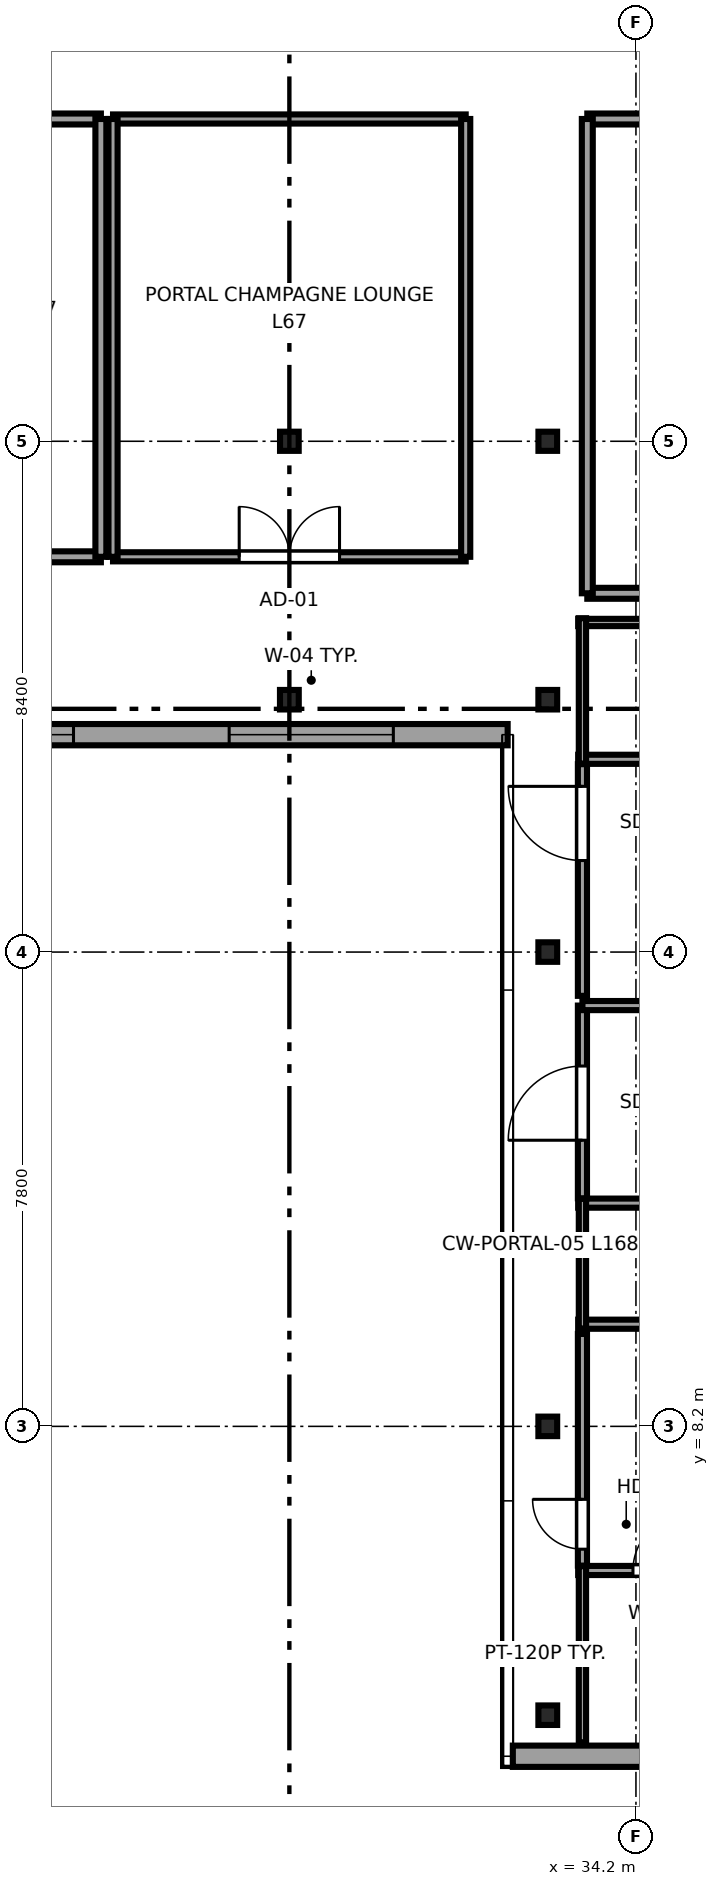
"""IFC4 building model, lengths in metres.
Left out: names, types, materials, properties, quantities, classifications, styles, units other than length and angle.
Written with IfcOpenShell. Run it as: python <this file> out.ifc"""

import sys

from ifc_helpers import new_model, si_unit, direction, frame, frame_2d, origin, origin_2d, place, context, subcontext, project, spatial, rectangle, i_section, extrude, source, transform, mapped, element, fill, save


model = new_model("IFC4")
c1 = context("Model", 3, precision=1e-05, world=origin(), true_north=direction((0.0, 1.0)))
c2 = subcontext(c1, "Body", "Model", "MODEL_VIEW")
j1 = project(units=[si_unit("LENGTHUNIT", "METRE"), si_unit("PLANEANGLEUNIT", "RADIAN")], contexts=[c1])
p1 = place(None, origin())
s1 = spatial("IfcSite", under=j1, at=p1, CompositionType="ELEMENT")
p2 = place(p1, origin())
s2 = spatial("IfcBuilding", under=s1, at=p2, CompositionType="ELEMENT")
p3 = place(p2, frame((0.0, 0.0, 252.3)))
s3 = spatial("IfcBuildingStorey", under=s2, at=p3, CompositionType="ELEMENT", Elevation=252.3)
m1 = source(origin(), c2, "Body", "SweptSolid", [
    extrude(i_section(OverallWidth=0.309, OverallDepth=0.321, WebThickness=0.014, FlangeThickness=0.022, FilletRadius=0.017, at=origin_2d()), origin(), (0.0, 0.0, 1.0), 3.55),
])
for number, where, z_axis, x_axis in (
    (1, (32.75, 3.45, 0.0), (0.0, 0.0, 1.0), (1.0, 0.0, 0.0)),
    (2, (32.75, 8.2, 0.0), (0.0, 0.0, 1.0), (1.0, 0.0, 0.0)),
    (3, (32.75, 16.0, 0.0), (0.0, 0.0, 1.0), (1.0, 0.0, 0.0)),
):
    element("IfcColumn", number, at=place(p3, frame(where, z_axis=z_axis, x_axis=x_axis)), inside=s3, PredefinedType="COLUMN", context=c2, shape_type="MappedRepresentation", body=[
        mapped(m1, transform((0.0, 0.0, 0.0), x_axis=(1.0, 0.0, 0.0), y_axis=(0.0, 1.0, 0.0), z_axis=(0.0, 0.0, 1.0), scale=1.0)),
    ])
m2 = source(origin(), c2, "Body", "SweptSolid", [
    extrude(i_section(OverallWidth=0.307, OverallDepth=0.315, WebThickness=0.012, FlangeThickness=0.019, FilletRadius=0.017, at=origin_2d()), origin(), (0.0, 0.0, 1.0), 3.55),
])
for number, where, z_axis, x_axis in (
    (4, (28.5, 24.4, 0.0), (0.0, 0.0, 1.0), (1.0, 0.0, 0.0)),
    (5, (32.75, 24.4, 0.0), (0.0, 0.0, 1.0), (1.0, 0.0, 0.0)),
):
    element("IfcColumn", number, at=place(p3, frame(where, z_axis=z_axis, x_axis=x_axis)), inside=s3, PredefinedType="COLUMN", context=c2, shape_type="MappedRepresentation", body=[
        mapped(m2, transform((0.0, 0.0, 0.0), x_axis=(1.0, 0.0, 0.0), y_axis=(0.0, 1.0, 0.0), z_axis=(0.0, 0.0, 1.0), scale=1.0)),
    ])
for number, where, z_axis, x_axis in (
    (6, (28.5, 20.15, 0.0), (0.0, 0.0, 1.0), (1.0, 0.0, 0.0)),
    (7, (32.75, 20.15, 0.0), (0.0, 0.0, 1.0), (1.0, 0.0, 0.0)),
):
    element("IfcColumn", number, at=place(p3, frame(where, z_axis=z_axis, x_axis=x_axis)), inside=s3, PredefinedType="COLUMN", context=c2, shape_type="MappedRepresentation", body=[
        mapped(m1, transform((0.0, 0.0, 0.0), x_axis=(1.0, 0.0, 0.0), y_axis=(0.0, 1.0, 0.0), z_axis=(0.0, 0.0, 1.0), scale=1.0)),
    ])
p4 = place(p3, frame((15.11, 19.575, 0.0), z_axis=(0.0, 0.0, 1.0), x_axis=(1.0, 0.0, 0.0)))
e8 = element("IfcWall", 8, at=p4, inside=s3, PredefinedType="SOLIDWALL", context=c2, shape_type="SweptSolid", body=[
    extrude(rectangle(XDim=16.98, YDim=0.35, at=frame_2d((8.49, 0.0))), origin(), (0.0, 0.0, 1.0), 3.37),
])
p5 = place(p4, frame((1.88, 0.0, 0.68)))
e9 = element("IfcOpeningElement", 9, at=p5, cuts=e8, PredefinedType="OPENING", context=c2, shape_type="SweptSolid", body=[
    extrude(rectangle(XDim=2.7, YDim=1.95, at=frame_2d((1.35, 0.975))), frame((0.0, 0.185, 0.0), z_axis=(0.0, -1.0, 0.0), x_axis=(1.0, 0.0, 0.0)), (0.0, 0.0, 1.0), 0.37),
])
p6 = place(p4, frame((7.14, 0.0, 0.68)))
e10 = element("IfcOpeningElement", 10, at=p6, cuts=e8, PredefinedType="OPENING", context=c2, shape_type="SweptSolid", body=[
    extrude(rectangle(XDim=2.7, YDim=1.95, at=frame_2d((1.35, 0.975))), frame((0.0, 0.185, 0.0), z_axis=(0.0, -1.0, 0.0), x_axis=(1.0, 0.0, 0.0)), (0.0, 0.0, 1.0), 0.37),
])
p7 = place(p4, frame((12.4, 0.0, 0.68)))
e11 = element("IfcOpeningElement", 11, at=p7, cuts=e8, PredefinedType="OPENING", context=c2, shape_type="SweptSolid", body=[
    extrude(rectangle(XDim=2.7, YDim=1.95, at=frame_2d((1.35, 0.975))), frame((0.0, 0.185, 0.0), z_axis=(0.0, -1.0, 0.0), x_axis=(1.0, 0.0, 0.0)), (0.0, 0.0, 1.0), 0.37),
])
p8 = place(p3, frame((32.175, 2.775, 0.0), z_axis=(0.0, 0.0, 1.0), x_axis=(1.0, 0.0, 0.0)))
e12 = element("IfcWall", 12, at=p8, inside=s3, PredefinedType="SOLIDWALL", context=c2, shape_type="SweptSolid", body=[
    extrude(rectangle(XDim=2.408, YDim=0.35, at=frame_2d((1.204, 0.0))), origin(), (0.0, 0.0, 1.0), 3.37),
])
p9 = place(p3, frame((33.25, 5.83, 0.0), z_axis=(0.0, 0.0, 1.0), x_axis=(1.0, 0.0, 0.0)))
e13 = element("IfcWall", 13, at=p9, inside=s3, PredefinedType="PARTITIONING", context=c2, shape_type="SweptSolid", body=[
    extrude(rectangle(XDim=2.722, YDim=0.15, at=frame_2d((1.361, 0.0))), origin(), (0.0, 0.0, 1.0), 3.37),
])
p10 = place(p9, frame((0.901, 0.0, 0.0)))
e14 = element("IfcOpeningElement", 14, at=p10, cuts=e13, PredefinedType="OPENING", context=c2, shape_type="SweptSolid", body=[
    extrude(rectangle(XDim=0.92, YDim=2.01, at=frame_2d((0.46, 1.005))), frame((0.0, 0.085, 0.0), z_axis=(0.0, -1.0, 0.0), x_axis=(1.0, 0.0, 0.0)), (0.0, 0.0, 1.0), 0.17),
])
p11 = place(p3, frame((33.32, 3.005, 0.0), z_axis=(0.0, 0.0, 1.0), x_axis=(0.0, 1.0, 0.0)))
e15 = element("IfcWall", 15, at=p11, inside=s3, PredefinedType="PLUMBINGWALL", context=c2, shape_type="SweptSolid", body=[
    extrude(rectangle(XDim=2.895, YDim=0.12, at=frame_2d((1.448, 0.0))), origin(), (0.0, 0.0, 1.0), 3.37),
])
p12 = place(p3, frame((33.25, 9.88, 0.0), z_axis=(0.0, 0.0, 1.0), x_axis=(1.0, 0.0, 0.0)))
e16 = element("IfcWall", 16, at=p12, inside=s3, PredefinedType="PARTITIONING", context=c2, shape_type="SweptSolid", body=[
    extrude(rectangle(XDim=5.345, YDim=0.15, at=frame_2d((2.672, 0.0))), origin(), (0.0, 0.0, 1.0), 3.37),
])
p13 = place(p3, frame((33.25, 11.871, 0.0), z_axis=(0.0, 0.0, 1.0), x_axis=(1.0, 0.0, 0.0)))
e17 = element("IfcWall", 17, at=p13, inside=s3, PredefinedType="PARTITIONING", context=c2, shape_type="SweptSolid", body=[
    extrude(rectangle(XDim=2.29, YDim=0.15, at=frame_2d((1.145, 0.0))), origin(), (0.0, 0.0, 1.0), 3.37),
])
p14 = place(p3, frame((33.32, 9.81, 0.0), z_axis=(0.0, 0.0, 1.0), x_axis=(0.0, 1.0, 0.0)))
e18 = element("IfcWall", 18, at=p14, inside=s3, PredefinedType="PLUMBINGWALL", context=c2, shape_type="SweptSolid", body=[
    extrude(rectangle(XDim=2.131, YDim=0.12, at=frame_2d((1.065, 0.0))), origin(), (0.0, 0.0, 1.0), 3.37),
])
p15 = place(p3, frame((33.25, 19.17, 0.0), z_axis=(0.0, 0.0, 1.0), x_axis=(1.0, 0.0, 0.0)))
e19 = element("IfcWall", 19, at=p15, inside=s3, PredefinedType="PARTITIONING", context=c2, shape_type="SweptSolid", body=[
    extrude(rectangle(XDim=2.29, YDim=0.15, at=frame_2d((1.145, 0.0))), origin(), (0.0, 0.0, 1.0), 3.37),
])
p16 = place(p3, frame((33.25, 21.42, 0.0), z_axis=(0.0, 0.0, 1.0), x_axis=(1.0, 0.0, 0.0)))
e20 = element("IfcWall", 20, at=p16, inside=s3, PredefinedType="PLUMBINGWALL", context=c2, shape_type="SweptSolid", body=[
    extrude(rectangle(XDim=2.29, YDim=0.12, at=frame_2d((1.145, 0.0))), origin(), (0.0, 0.0, 1.0), 3.37),
])
p17 = place(p3, frame((33.32, 19.1, 0.0), z_axis=(0.0, 0.0, 1.0), x_axis=(0.0, 1.0, 0.0)))
e21 = element("IfcWall", 21, at=p17, inside=s3, PredefinedType="PLUMBINGWALL", context=c2, shape_type="SweptSolid", body=[
    extrude(rectangle(XDim=2.39, YDim=0.12, at=frame_2d((1.195, 0.0))), origin(), (0.0, 0.0, 1.0), 3.37),
])
p18 = place(p3, frame((33.32, 5.91, 0.0), z_axis=(0.0, 0.0, 1.0), x_axis=(0.0, 1.0, 0.0)))
e22 = element("IfcWall", 22, at=p18, inside=s3, PredefinedType="PARTITIONING", context=c2, shape_type="SweptSolid", body=[
    extrude(rectangle(XDim=3.81, YDim=0.15, at=frame_2d((1.905, 0.0))), origin(), (0.0, 0.0, 1.0), 3.37),
])
p19 = place(p18, frame((0.27, 0.0, 0.0)))
e23 = element("IfcOpeningElement", 23, at=p19, cuts=e22, PredefinedType="OPENING", context=c2, shape_type="SweptSolid", body=[
    extrude(rectangle(XDim=0.82, YDim=2.01, at=frame_2d((0.41, 1.005))), frame((0.0, 0.085, 0.0), z_axis=(0.0, -1.0, 0.0), x_axis=(1.0, 0.0, 0.0)), (0.0, 0.0, 1.0), 0.17),
])
p20 = place(p3, frame((33.32, 11.951, 0.0), z_axis=(0.0, 0.0, 1.0), x_axis=(0.0, 1.0, 0.0)))
e24 = element("IfcWall", 24, at=p20, inside=s3, PredefinedType="PARTITIONING", context=c2, shape_type="SweptSolid", body=[
    extrude(rectangle(XDim=3.169, YDim=0.15, at=frame_2d((1.584, 0.0))), origin(), (0.0, 0.0, 1.0), 3.37),
])
p21 = place(p20, frame((0.955, 0.0, 0.0)))
e25 = element("IfcOpeningElement", 25, at=p21, cuts=e24, PredefinedType="OPENING", context=c2, shape_type="SweptSolid", body=[
    extrude(rectangle(XDim=1.22, YDim=2.08, at=frame_2d((0.61, 1.04))), frame((0.0, 0.085, 0.0), z_axis=(0.0, -1.0, 0.0), x_axis=(1.0, 0.0, 0.0)), (0.0, 0.0, 1.0), 0.17),
])
p22 = place(p3, frame((33.32, 15.12, 0.0), z_axis=(0.0, 0.0, 1.0), x_axis=(1.0, 0.0, 0.0)))
e26 = element("IfcWall", 26, at=p22, inside=s3, PredefinedType="PARTITIONING", context=c2, shape_type="SweptSolid", body=[
    extrude(rectangle(XDim=5.275, YDim=0.15, at=frame_2d((2.637, 0.0))), origin(), (0.0, 0.0, 1.0), 3.37),
])
p23 = place(p3, frame((33.32, 15.28, 0.0), z_axis=(0.0, 0.0, 1.0), x_axis=(0.0, 1.0, 0.0)))
e27 = element("IfcWall", 27, at=p23, inside=s3, PredefinedType="PARTITIONING", context=c2, shape_type="SweptSolid", body=[
    extrude(rectangle(XDim=3.81, YDim=0.15, at=frame_2d((1.905, 0.0))), origin(), (0.0, 0.0, 1.0), 3.37),
])
p24 = place(p23, frame((2.225, 0.0, 0.0)))
e28 = element("IfcOpeningElement", 28, at=p24, cuts=e27, PredefinedType="OPENING", context=c2, shape_type="SweptSolid", body=[
    extrude(rectangle(XDim=1.22, YDim=2.08, at=frame_2d((0.61, 1.04))), frame((0.0, 0.085, 0.0), z_axis=(0.0, -1.0, 0.0), x_axis=(1.0, 0.0, 0.0)), (0.0, 0.0, 1.0), 0.17),
])
p25 = place(p3, frame((18.8, 22.5, 0.0), z_axis=(0.0, 0.0, 1.0), x_axis=(1.0, 0.0, 0.0)))
e29 = element("IfcWall", 29, at=p25, inside=s3, PredefinedType="PARTITIONING", context=c2, shape_type="SweptSolid", body=[
    extrude(rectangle(XDim=6.6, YDim=0.18, at=frame_2d((3.3, 0.0))), origin(), (0.0, 0.0, 1.0), 3.37),
])
p26 = place(p25, frame((2.475, 0.0, 0.0)))
e30 = element("IfcOpeningElement", 30, at=p26, cuts=e29, PredefinedType="OPENING", context=c2, shape_type="SweptSolid", body=[
    extrude(rectangle(XDim=1.65, YDim=2.15, at=frame_2d((0.825, 1.075))), frame((0.0, 0.1, 0.0), z_axis=(0.0, -1.0, 0.0), x_axis=(1.0, 0.0, 0.0)), (0.0, 0.0, 1.0), 0.2),
])
p27 = place(p3, frame((18.8, 29.7, 0.0), z_axis=(0.0, 0.0, 1.0), x_axis=(1.0, 0.0, 0.0)))
e31 = element("IfcWall", 31, at=p27, inside=s3, PredefinedType="PARTITIONING", context=c2, shape_type="SweptSolid", body=[
    extrude(rectangle(XDim=6.6, YDim=0.18, at=frame_2d((3.3, 0.0))), origin(), (0.0, 0.0, 1.0), 3.37),
])
p28 = place(p3, frame((25.4, 22.5, 0.0), z_axis=(0.0, 0.0, 1.0), x_axis=(0.0, 1.0, 0.0)))
e32 = element("IfcWall", 32, at=p28, inside=s3, PredefinedType="PARTITIONING", context=c2, shape_type="SweptSolid", body=[
    extrude(rectangle(XDim=7.2, YDim=0.18, at=frame_2d((3.6, 0.0))), origin(), (0.0, 0.0, 1.0), 3.37),
])
p29 = place(p3, frame((25.6, 22.5, 0.0), z_axis=(0.0, 0.0, 1.0), x_axis=(1.0, 0.0, 0.0)))
e33 = element("IfcWall", 33, at=p29, inside=s3, PredefinedType="PARTITIONING", context=c2, shape_type="SweptSolid", body=[
    extrude(rectangle(XDim=5.8, YDim=0.15, at=frame_2d((2.9, 0.0))), origin(), (0.0, 0.0, 1.0), 3.37),
])
p30 = place(p29, frame((2.075, 0.0, 0.0)))
e34 = element("IfcOpeningElement", 34, at=p30, cuts=e33, PredefinedType="OPENING", context=c2, shape_type="SweptSolid", body=[
    extrude(rectangle(XDim=1.65, YDim=2.15, at=frame_2d((0.825, 1.075))), frame((0.0, 0.085, 0.0), z_axis=(0.0, -1.0, 0.0), x_axis=(1.0, 0.0, 0.0)), (0.0, 0.0, 1.0), 0.17),
])
p31 = place(p3, frame((25.6, 29.7, 0.0), z_axis=(0.0, 0.0, 1.0), x_axis=(1.0, 0.0, 0.0)))
e35 = element("IfcWall", 35, at=p31, inside=s3, PredefinedType="PARTITIONING", context=c2, shape_type="SweptSolid", body=[
    extrude(rectangle(XDim=5.8, YDim=0.15, at=frame_2d((2.9, 0.0))), origin(), (0.0, 0.0, 1.0), 3.37),
])
for number, where, z_axis, x_axis in (
    (36, (25.6, 22.5, 0.0), (0.0, 0.0, 1.0), (0.0, 1.0, 0.0)),
    (37, (31.4, 22.5, 0.0), (0.0, 0.0, 1.0), (0.0, 1.0, 0.0)),
):
    element("IfcWall", number, at=place(p3, frame(where, z_axis=z_axis, x_axis=x_axis)), inside=s3, PredefinedType="PARTITIONING", context=c2, shape_type="SweptSolid", body=[
        extrude(rectangle(XDim=7.2, YDim=0.15, at=frame_2d((3.6, 0.0))), origin(), (0.0, 0.0, 1.0), 3.37),
    ])
p32 = place(p3, frame((33.4, 21.9, 0.0), z_axis=(0.0, 0.0, 1.0), x_axis=(1.0, 0.0, 0.0)))
e38 = element("IfcWall", 38, at=p32, inside=s3, PredefinedType="PARTITIONING", context=c2, shape_type="SweptSolid", body=[
    extrude(rectangle(XDim=5.195, YDim=0.18, at=frame_2d((2.598, 0.0))), origin(), (0.0, 0.0, 1.0), 3.37),
])
p33 = place(p3, frame((33.4, 29.7, 0.0), z_axis=(0.0, 0.0, 1.0), x_axis=(1.0, 0.0, 0.0)))
e39 = element("IfcWall", 39, at=p33, inside=s3, PredefinedType="PARTITIONING", context=c2, shape_type="SweptSolid", body=[
    extrude(rectangle(XDim=5.195, YDim=0.18, at=frame_2d((2.598, 0.0))), origin(), (0.0, 0.0, 1.0), 3.37),
])
p34 = place(p33, frame((1.772, 0.0, 0.0)))
e40 = element("IfcOpeningElement", 40, at=p34, cuts=e39, PredefinedType="OPENING", context=c2, shape_type="SweptSolid", body=[
    extrude(rectangle(XDim=1.65, YDim=2.15, at=frame_2d((0.825, 1.075))), frame((0.0, 0.1, 0.0), z_axis=(0.0, -1.0, 0.0), x_axis=(1.0, 0.0, 0.0)), (0.0, 0.0, 1.0), 0.2),
])
p35 = place(p3, frame((33.4, 21.9, 0.0), z_axis=(0.0, 0.0, 1.0), x_axis=(0.0, 1.0, 0.0)))
e41 = element("IfcWall", 41, at=p35, inside=s3, PredefinedType="PARTITIONING", context=c2, shape_type="SweptSolid", body=[
    extrude(rectangle(XDim=7.8, YDim=0.18, at=frame_2d((3.9, 0.0))), origin(), (0.0, 0.0, 1.0), 3.37),
])
m3 = source(origin(), c2, "Body", "SweptSolid", [
    extrude(rectangle(XDim=2.7, YDim=1.95, at=frame_2d((1.35, 0.975))), frame((0.0, 0.09, 0.0), z_axis=(0.0, -1.0, 0.0), x_axis=(1.0, 0.0, 0.0)), (0.0, 0.0, 1.0), 0.06),
])
p36 = place(p6, origin())
e42 = element("IfcWindow", 42, at=p36, inside=s3, PartitioningType="TRIPLE_PANEL_HORIZONTAL", PredefinedType="WINDOW", context=c2, shape_type="MappedRepresentation", body=[
    mapped(m3, transform((0.0, 0.0, 0.0), x_axis=(1.0, 0.0, 0.0), y_axis=(0.0, 1.0, 0.0), z_axis=(0.0, 0.0, 1.0), scale=1.0)),
])
fill(e10, e42)
p37 = place(p7, origin())
e43 = element("IfcWindow", 43, at=p37, inside=s3, PartitioningType="TRIPLE_PANEL_HORIZONTAL", PredefinedType="WINDOW", context=c2, shape_type="MappedRepresentation", body=[
    mapped(m3, transform((0.0, 0.0, 0.0), x_axis=(1.0, 0.0, 0.0), y_axis=(0.0, 1.0, 0.0), z_axis=(0.0, 0.0, 1.0), scale=1.0)),
])
fill(e11, e43)
m4 = source(origin(), c2, "Body", "SweptSolid", [
    extrude(rectangle(XDim=0.92, YDim=2.01, at=frame_2d((0.46, 1.005))), frame((0.0, 0.025, 0.0), z_axis=(0.0, -1.0, 0.0), x_axis=(1.0, 0.0, 0.0)), (0.0, 0.0, 1.0), 0.05),
])
p38 = place(p10, origin())
e44 = element("IfcDoor", 44, at=p38, inside=s3, OperationType="SINGLE_SWING_RIGHT", PredefinedType="DOOR", context=c2, shape_type="MappedRepresentation", body=[
    mapped(m4, transform((0.0, 0.0, 0.0), x_axis=(1.0, 0.0, 0.0), y_axis=(0.0, 1.0, 0.0), z_axis=(0.0, 0.0, 1.0), scale=1.0)),
])
fill(e14, e44)
m5 = source(origin(), c2, "Body", "SweptSolid", [
    extrude(rectangle(XDim=0.82, YDim=2.01, at=frame_2d((0.41, 1.005))), frame((0.0, 0.025, 0.0), z_axis=(0.0, -1.0, 0.0), x_axis=(1.0, 0.0, 0.0)), (0.0, 0.0, 1.0), 0.05),
])
p39 = place(p19, origin())
e45 = element("IfcDoor", 45, at=p39, inside=s3, OperationType="SINGLE_SWING_RIGHT", PredefinedType="DOOR", context=c2, shape_type="MappedRepresentation", body=[
    mapped(m5, transform((0.0, 0.0, 0.0), x_axis=(1.0, 0.0, 0.0), y_axis=(0.0, 1.0, 0.0), z_axis=(0.0, 0.0, 1.0), scale=1.0)),
])
fill(e23, e45)
m6 = source(origin(), c2, "Body", "SweptSolid", [
    extrude(rectangle(XDim=1.22, YDim=2.08, at=frame_2d((0.61, 1.04))), frame((0.0, 0.025, 0.0), z_axis=(0.0, -1.0, 0.0), x_axis=(1.0, 0.0, 0.0)), (0.0, 0.0, 1.0), 0.05),
])
p40 = place(p21, origin())
e46 = element("IfcDoor", 46, at=p40, inside=s3, OperationType="SINGLE_SWING_LEFT", PredefinedType="DOOR", context=c2, shape_type="MappedRepresentation", body=[
    mapped(m6, transform((0.0, 0.0, 0.0), x_axis=(1.0, 0.0, 0.0), y_axis=(0.0, 1.0, 0.0), z_axis=(0.0, 0.0, 1.0), scale=1.0)),
])
fill(e25, e46)
p41 = place(p24, origin())
e47 = element("IfcDoor", 47, at=p41, inside=s3, OperationType="SINGLE_SWING_RIGHT", PredefinedType="DOOR", context=c2, shape_type="MappedRepresentation", body=[
    mapped(m6, transform((0.0, 0.0, 0.0), x_axis=(1.0, 0.0, 0.0), y_axis=(0.0, 1.0, 0.0), z_axis=(0.0, 0.0, 1.0), scale=1.0)),
])
fill(e28, e47)
m7 = source(origin(), c2, "Body", "SweptSolid", [
    extrude(rectangle(XDim=1.65, YDim=2.15, at=frame_2d((0.825, 1.075))), frame((0.0, 0.025, 0.0), z_axis=(0.0, -1.0, 0.0), x_axis=(1.0, 0.0, 0.0)), (0.0, 0.0, 1.0), 0.05),
])
p42 = place(p30, origin())
e48 = element("IfcDoor", 48, at=p42, inside=s3, OperationType="DOUBLE_DOOR_SINGLE_SWING", PredefinedType="DOOR", context=c2, shape_type="MappedRepresentation", body=[
    mapped(m7, transform((0.0, 0.0, 0.0), x_axis=(1.0, 0.0, 0.0), y_axis=(0.0, 1.0, 0.0), z_axis=(0.0, 0.0, 1.0), scale=1.0)),
])
fill(e34, e48)
save(model, sys.argv[1])
